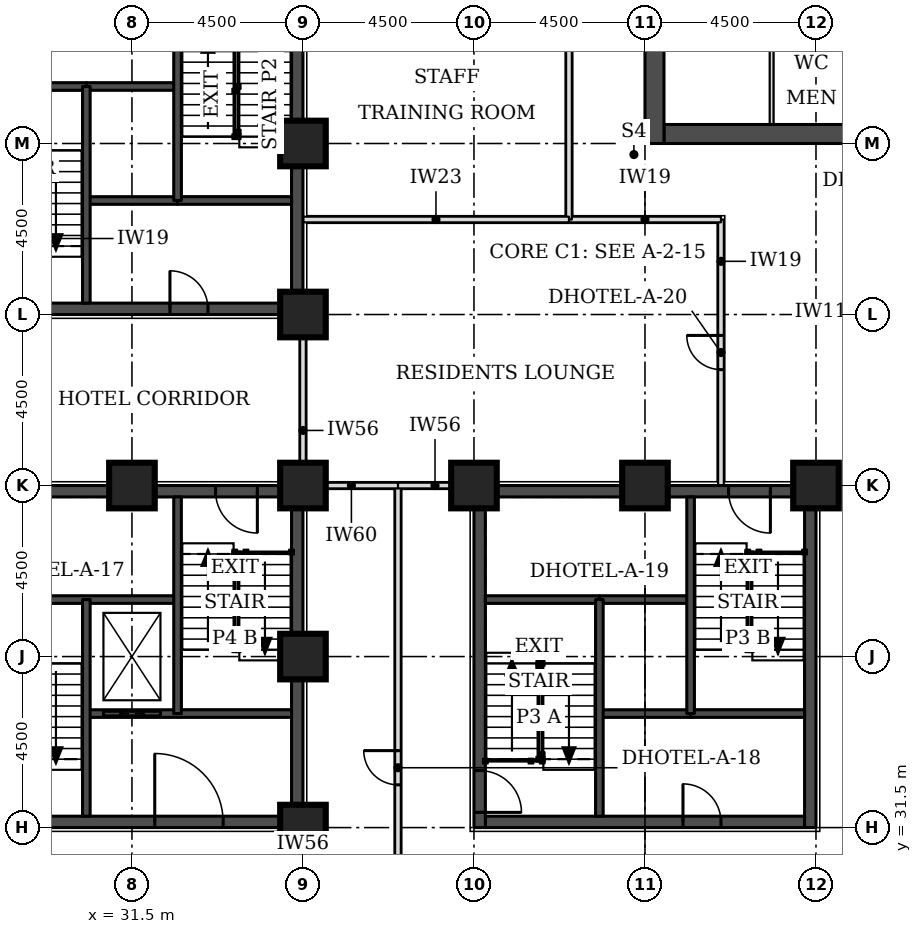
"""IFC4 building model, lengths in metres.
Left out: names, types, materials, properties, quantities, classifications, styles, units other than length and angle.
Written with IfcOpenShell. Run it as: python <this file> out.ifc"""

import sys

from ifc_helpers import new_model, si_unit, direction, frame, frame_2d, origin, origin_2d, place, context, subcontext, project, spatial, rectangle, extrude, element, fill, save


model = new_model("IFC4")
c1 = context("Model", 3, precision=1e-05, world=origin(), true_north=direction((0.0, 1.0)))
c2 = subcontext(c1, "Body", "Model", "MODEL_VIEW")
j1 = project(units=[si_unit("LENGTHUNIT", "METRE"), si_unit("PLANEANGLEUNIT", "RADIAN")], contexts=[c1])
p1 = place(None, origin())
s1 = spatial("IfcSite", under=j1, at=p1, CompositionType="ELEMENT")
p2 = place(p1, origin())
s2 = spatial("IfcBuilding", under=s1, at=p2, CompositionType="ELEMENT")
p3 = place(p2, frame((0.0, 0.0, 49.5)))
s3 = spatial("IfcBuildingStorey", under=s2, at=p3, CompositionType="ELEMENT", Elevation=49.5)
for number, where, z_axis, x_axis in (
    (1, (36.0, 31.5, 0.0), (0.0, 0.0, 1.0), (1.0, 0.0, 0.0)),
    (2, (36.0, 36.0, 0.0), (0.0, 0.0, 1.0), (1.0, 0.0, 0.0)),
    (3, (31.5, 40.5, 0.0), (0.0, 0.0, 1.0), (1.0, 0.0, 0.0)),
    (4, (36.0, 40.5, 0.0), (0.0, 0.0, 1.0), (1.0, 0.0, 0.0)),
    (5, (40.5, 40.5, 0.0), (0.0, 0.0, 1.0), (1.0, 0.0, 0.0)),
    (6, (45.0, 40.5, 0.0), (0.0, 0.0, 1.0), (1.0, 0.0, 0.0)),
    (7, (49.5, 40.5, 0.0), (0.0, 0.0, 1.0), (1.0, 0.0, 0.0)),
    (8, (36.0, 45.0, 0.0), (0.0, 0.0, 1.0), (1.0, 0.0, 0.0)),
    (9, (36.0, 49.5, 0.0), (0.0, 0.0, 1.0), (1.0, 0.0, 0.0)),
):
    element("IfcColumn", number, at=place(p3, frame(where, z_axis=z_axis, x_axis=x_axis)), inside=s3, PredefinedType="COLUMN", context=c2, shape_type="SweptSolid", body=[
        extrude(rectangle(XDim=1.2, YDim=1.2, at=origin_2d()), origin(), (0.0, 0.0, 1.0), 3.3),
    ])
p4 = place(p3, frame((45.5, 49.75, 0.0), z_axis=(0.0, 0.0, 1.0), x_axis=(1.0, 0.0, 0.0)))
e10 = element("IfcWall", 10, at=p4, inside=s3, PredefinedType="SHEAR", context=c2, shape_type="SweptSolid", body=[
    extrude(rectangle(XDim=21.5, YDim=0.5, at=frame_2d((10.75, 0.0))), origin(), (0.0, 0.0, 1.0), 3.3),
])
p5 = place(p3, frame((45.25, 49.5, 0.0), z_axis=(0.0, 0.0, 1.0), x_axis=(0.0, 1.0, 0.0)))
e11 = element("IfcWall", 11, at=p5, inside=s3, PredefinedType="SHEAR", context=c2, shape_type="SweptSolid", body=[
    extrude(rectangle(XDim=22.5, YDim=0.5, at=frame_2d((11.25, 0.0))), origin(), (0.0, 0.0, 1.0), 3.3),
])
p6 = place(p5, frame((4.2, 0.0, 0.0)))
e12 = element("IfcOpeningElement", 12, at=p6, cuts=e11, PredefinedType="OPENING", context=c2, shape_type="SweptSolid", body=[
    extrude(rectangle(XDim=1.8, YDim=2.1, at=frame_2d((0.9, 1.05))), frame((0.0, 0.26, 0.0), z_axis=(0.0, -1.0, 0.0), x_axis=(1.0, 0.0, 0.0)), (0.0, 0.0, 1.0), 0.52),
])
p7 = place(p5, frame((6.9, 0.0, 0.0)))
e13 = element("IfcOpeningElement", 13, at=p7, cuts=e11, PredefinedType="OPENING", context=c2, shape_type="SweptSolid", body=[
    extrude(rectangle(XDim=1.1, YDim=2.1, at=frame_2d((0.55, 1.05))), frame((0.0, 0.26, 0.0), z_axis=(0.0, -1.0, 0.0), x_axis=(1.0, 0.0, 0.0)), (0.0, 0.0, 1.0), 0.52),
])
p8 = place(p5, frame((13.6, 0.0, 0.0)))
e14 = element("IfcOpeningElement", 14, at=p8, cuts=e11, PredefinedType="OPENING", context=c2, shape_type="SweptSolid", body=[
    extrude(rectangle(XDim=1.1, YDim=2.1, at=frame_2d((0.55, 1.05))), frame((0.0, 0.26, 0.0), z_axis=(0.0, -1.0, 0.0), x_axis=(1.0, 0.0, 0.0)), (0.0, 0.0, 1.0), 0.52),
])
p9 = place(p5, frame((16.5, 0.0, 0.0)))
e15 = element("IfcOpeningElement", 15, at=p9, cuts=e11, PredefinedType="OPENING", context=c2, shape_type="SweptSolid", body=[
    extrude(rectangle(XDim=1.8, YDim=2.1, at=frame_2d((0.9, 1.05))), frame((0.0, 0.26, 0.0), z_axis=(0.0, -1.0, 0.0), x_axis=(1.0, 0.0, 0.0)), (0.0, 0.0, 1.0), 0.52),
])
p10 = place(p3, frame((27.3, 45.15, 0.0), z_axis=(0.0, 0.0, 1.0), x_axis=(1.0, 0.0, 0.0)))
e16 = element("IfcWall", 16, at=p10, inside=s3, PredefinedType="SHEAR", context=c2, shape_type="SweptSolid", body=[
    extrude(rectangle(XDim=8.4, YDim=0.3, at=frame_2d((4.2, 0.0))), origin(), (0.0, 0.0, 1.0), 3.3),
])
p11 = place(p10, frame((5.2, 0.0, 0.0)))
e17 = element("IfcOpeningElement", 17, at=p11, cuts=e16, PredefinedType="OPENING", context=c2, shape_type="SweptSolid", body=[
    extrude(rectangle(XDim=1.0, YDim=2.1, at=frame_2d((0.5, 1.05))), frame((0.0, 0.16, 0.0), z_axis=(0.0, -1.0, 0.0), x_axis=(1.0, 0.0, 0.0)), (0.0, 0.0, 1.0), 0.32),
])
p12 = place(p3, frame((35.85, 45.0, 0.0), z_axis=(0.0, 0.0, 1.0), x_axis=(0.0, 1.0, 0.0)))
e18 = element("IfcWall", 18, at=p12, inside=s3, PredefinedType="SHEAR", context=c2, shape_type="SweptSolid", body=[
    extrude(rectangle(XDim=9.0, YDim=0.3, at=frame_2d((4.5, 0.0))), origin(), (0.0, 0.0, 1.0), 3.3),
])
p13 = place(p3, frame((40.8, 31.65, 0.0), z_axis=(0.0, 0.0, 1.0), x_axis=(1.0, 0.0, 0.0)))
e19 = element("IfcWall", 19, at=p13, inside=s3, PredefinedType="SHEAR", context=c2, shape_type="SweptSolid", body=[
    extrude(rectangle(XDim=8.4, YDim=0.3, at=frame_2d((4.2, 0.0))), origin(), (0.0, 0.0, 1.0), 3.3),
])
p14 = place(p13, frame((5.2, 0.0, 0.0)))
e20 = element("IfcOpeningElement", 20, at=p14, cuts=e19, PredefinedType="OPENING", context=c2, shape_type="SweptSolid", body=[
    extrude(rectangle(XDim=1.0, YDim=2.1, at=frame_2d((0.5, 1.05))), frame((0.0, 0.16, 0.0), z_axis=(0.0, -1.0, 0.0), x_axis=(1.0, 0.0, 0.0)), (0.0, 0.0, 1.0), 0.32),
])
p15 = place(p3, frame((40.8, 40.35, 0.0), z_axis=(0.0, 0.0, 1.0), x_axis=(1.0, 0.0, 0.0)))
e21 = element("IfcWall", 21, at=p15, inside=s3, PredefinedType="SHEAR", context=c2, shape_type="SweptSolid", body=[
    extrude(rectangle(XDim=8.4, YDim=0.3, at=frame_2d((4.2, 0.0))), origin(), (0.0, 0.0, 1.0), 3.3),
])
p16 = place(p15, frame((6.4, 0.0, 0.0)))
e22 = element("IfcOpeningElement", 22, at=p16, cuts=e21, PredefinedType="OPENING", context=c2, shape_type="SweptSolid", body=[
    extrude(rectangle(XDim=1.1, YDim=2.1, at=frame_2d((0.55, 1.05))), frame((0.0, 0.16, 0.0), z_axis=(0.0, -1.0, 0.0), x_axis=(1.0, 0.0, 0.0)), (0.0, 0.0, 1.0), 0.32),
])
p17 = place(p3, frame((40.65, 31.5, 0.0), z_axis=(0.0, 0.0, 1.0), x_axis=(0.0, 1.0, 0.0)))
e23 = element("IfcWall", 23, at=p17, inside=s3, PredefinedType="SHEAR", context=c2, shape_type="SweptSolid", body=[
    extrude(rectangle(XDim=9.0, YDim=0.3, at=frame_2d((4.5, 0.0))), origin(), (0.0, 0.0, 1.0), 3.3),
])
p18 = place(p17, frame((0.4, 0.0, 0.0)))
e24 = element("IfcOpeningElement", 24, at=p18, cuts=e23, PredefinedType="OPENING", context=c2, shape_type="SweptSolid", body=[
    extrude(rectangle(XDim=1.1, YDim=2.1, at=frame_2d((0.55, 1.05))), frame((0.0, 0.16, 0.0), z_axis=(0.0, -1.0, 0.0), x_axis=(1.0, 0.0, 0.0)), (0.0, 0.0, 1.0), 0.32),
])
p19 = place(p3, frame((49.35, 31.5, 0.0), z_axis=(0.0, 0.0, 1.0), x_axis=(0.0, 1.0, 0.0)))
e25 = element("IfcWall", 25, at=p19, inside=s3, PredefinedType="SHEAR", context=c2, shape_type="SweptSolid", body=[
    extrude(rectangle(XDim=9.0, YDim=0.3, at=frame_2d((4.5, 0.0))), origin(), (0.0, 0.0, 1.0), 3.3),
])
p20 = place(p3, frame((27.3, 31.65, 0.0), z_axis=(0.0, 0.0, 1.0), x_axis=(1.0, 0.0, 0.0)))
e26 = element("IfcWall", 26, at=p20, inside=s3, PredefinedType="SHEAR", context=c2, shape_type="SweptSolid", body=[
    extrude(rectangle(XDim=8.4, YDim=0.3, at=frame_2d((4.2, 0.0))), origin(), (0.0, 0.0, 1.0), 3.3),
])
p21 = place(p20, frame((4.8, 0.0, 0.0)))
e27 = element("IfcOpeningElement", 27, at=p21, cuts=e26, PredefinedType="OPENING", context=c2, shape_type="SweptSolid", body=[
    extrude(rectangle(XDim=1.8, YDim=2.1, at=frame_2d((0.9, 1.05))), frame((0.0, 0.16, 0.0), z_axis=(0.0, -1.0, 0.0), x_axis=(1.0, 0.0, 0.0)), (0.0, 0.0, 1.0), 0.32),
])
p22 = place(p3, frame((27.3, 40.35, 0.0), z_axis=(0.0, 0.0, 1.0), x_axis=(1.0, 0.0, 0.0)))
e28 = element("IfcWall", 28, at=p22, inside=s3, PredefinedType="SHEAR", context=c2, shape_type="SweptSolid", body=[
    extrude(rectangle(XDim=8.4, YDim=0.3, at=frame_2d((4.2, 0.0))), origin(), (0.0, 0.0, 1.0), 3.3),
])
p23 = place(p22, frame((6.4, 0.0, 0.0)))
e29 = element("IfcOpeningElement", 29, at=p23, cuts=e28, PredefinedType="OPENING", context=c2, shape_type="SweptSolid", body=[
    extrude(rectangle(XDim=1.1, YDim=2.1, at=frame_2d((0.55, 1.05))), frame((0.0, 0.16, 0.0), z_axis=(0.0, -1.0, 0.0), x_axis=(1.0, 0.0, 0.0)), (0.0, 0.0, 1.0), 0.32),
])
p24 = place(p3, frame((35.85, 31.5, 0.0), z_axis=(0.0, 0.0, 1.0), x_axis=(0.0, 1.0, 0.0)))
e30 = element("IfcWall", 30, at=p24, inside=s3, PredefinedType="SHEAR", context=c2, shape_type="SweptSolid", body=[
    extrude(rectangle(XDim=9.0, YDim=0.3, at=frame_2d((4.5, 0.0))), origin(), (0.0, 0.0, 1.0), 3.3),
])
p25 = place(p3, frame((38.5, 25.65, 0.0), z_axis=(0.0, 0.0, 1.0), x_axis=(0.0, 1.0, 0.0)))
e31 = element("IfcWall", 31, at=p25, inside=s3, PredefinedType="PARTITIONING", context=c2, shape_type="SweptSolid", body=[
    extrude(rectangle(XDim=14.85, YDim=0.15, at=frame_2d((7.425, 0.0))), origin(), (0.0, 0.0, 1.0), 3.08),
])
p26 = place(p25, frame((6.975, 0.0, 0.0)))
e32 = element("IfcOpeningElement", 32, at=p26, cuts=e31, PredefinedType="OPENING", context=c2, shape_type="SweptSolid", body=[
    extrude(rectangle(XDim=0.9, YDim=2.1, at=frame_2d((0.45, 1.05))), frame((0.0, 0.085, 0.0), z_axis=(0.0, -1.0, 0.0), x_axis=(1.0, 0.0, 0.0)), (0.0, 0.0, 1.0), 0.17),
])
for number, where, z_axis, x_axis in (
    (33, (36.0, 29.5, 0.0), (0.0, 0.0, 1.0), (0.0, 1.0, 0.0)),
    (34, (38.5, 40.5, 0.0), (0.0, 0.0, 1.0), (1.0, 0.0, 0.0)),
):
    element("IfcWall", number, at=place(p3, frame(where, z_axis=z_axis, x_axis=x_axis)), inside=s3, PredefinedType="PARTITIONING", context=c2, shape_type="SweptSolid", body=[
        extrude(rectangle(XDim=1.95, YDim=0.15, at=frame_2d((0.975, 0.0))), origin(), (0.0, 0.0, 1.0), 2.33),
    ])
p27 = place(p3, frame((36.0, 40.55, 0.0), z_axis=(0.0, 0.0, 1.0), x_axis=(0.0, 1.0, 0.0)))
e35 = element("IfcWall", 35, at=p27, inside=s3, PredefinedType="PARTITIONING", context=c2, shape_type="SweptSolid", body=[
    extrude(rectangle(XDim=4.4, YDim=0.15, at=frame_2d((2.2, 0.0))), origin(), (0.0, 0.0, 1.0), 2.33),
])
p28 = place(p3, frame((47.0, 40.5, 0.0), z_axis=(0.0, 0.0, 1.0), x_axis=(0.0, 1.0, 0.0)))
e36 = element("IfcWall", 36, at=p28, inside=s3, PredefinedType="PARTITIONING", context=c2, shape_type="SweptSolid", body=[
    extrude(rectangle(XDim=7.0, YDim=0.15, at=frame_2d((3.5, 0.0))), origin(), (0.0, 0.0, 1.0), 3.08),
])
p29 = place(p28, frame((3.05, 0.0, 0.0)))
e37 = element("IfcOpeningElement", 37, at=p29, cuts=e36, PredefinedType="OPENING", context=c2, shape_type="SweptSolid", body=[
    extrude(rectangle(XDim=0.9, YDim=2.1, at=frame_2d((0.45, 1.05))), frame((0.0, 0.085, 0.0), z_axis=(0.0, -1.0, 0.0), x_axis=(1.0, 0.0, 0.0)), (0.0, 0.0, 1.0), 0.17),
])
p30 = place(p3, frame((43.0, 47.5, 0.0), z_axis=(0.0, 0.0, 1.0), x_axis=(1.0, 0.0, 0.0)))
e38 = element("IfcWall", 38, at=p30, inside=s3, PredefinedType="PARTITIONING", context=c2, shape_type="SweptSolid", body=[
    extrude(rectangle(XDim=4.0, YDim=0.15, at=frame_2d((2.0, 0.0))), origin(), (0.0, 0.0, 1.0), 3.08),
])
p31 = place(p3, frame((43.0, 47.5, 0.0), z_axis=(0.0, 0.0, 1.0), x_axis=(0.0, 1.0, 0.0)))
e39 = element("IfcWall", 39, at=p31, inside=s3, PredefinedType="PARTITIONING", context=c2, shape_type="SweptSolid", body=[
    extrude(rectangle(XDim=6.5, YDim=0.15, at=frame_2d((3.25, 0.0))), origin(), (0.0, 0.0, 1.0), 3.08),
])
p32 = place(p3, frame((36.05, 40.5, 0.0), z_axis=(0.0, 0.0, 1.0), x_axis=(1.0, 0.0, 0.0)))
e40 = element("IfcWall", 40, at=p32, inside=s3, PredefinedType="PARTITIONING", context=c2, shape_type="SweptSolid", body=[
    extrude(rectangle(XDim=2.45, YDim=0.15, at=frame_2d((1.225, 0.0))), origin(), (0.0, 0.0, 1.0), 2.33),
])
p33 = place(p3, frame((36.0, 47.5, 0.0), z_axis=(0.0, 0.0, 1.0), x_axis=(1.0, 0.0, 0.0)))
e41 = element("IfcWall", 41, at=p33, inside=s3, PredefinedType="PARTITIONING", context=c2, shape_type="SweptSolid", body=[
    extrude(rectangle(XDim=7.0, YDim=0.15, at=frame_2d((3.5, 0.0))), origin(), (0.0, 0.0, 1.0), 3.08),
])
p34 = place(p3, frame((48.333, 50.0, 0.0), z_axis=(0.0, 0.0, 1.0), x_axis=(0.0, 1.0, 0.0)))
e42 = element("IfcWall", 42, at=p34, inside=s3, PredefinedType="PARTITIONING", context=c2, shape_type="SweptSolid", body=[
    extrude(rectangle(XDim=3.0, YDim=0.1, at=frame_2d((1.5, 0.0))), origin(), (0.0, 0.0, 1.0), 3.08),
])
p35 = place(p3, frame((30.3, 48.0, 0.0), z_axis=(0.0, 0.0, 1.0), x_axis=(1.0, 0.0, 0.0)))
e43 = element("IfcWall", 43, at=p35, inside=s3, PredefinedType="SOLIDWALL", context=c2, shape_type="SweptSolid", body=[
    extrude(rectangle(XDim=2.4, YDim=0.2, at=frame_2d((1.2, 0.0))), origin(), (0.0, 0.0, 1.0), 3.08),
])
p36 = place(p3, frame((32.7, 48.0, 0.0), z_axis=(0.0, 0.0, 1.0), x_axis=(1.0, 0.0, 0.0)))
e44 = element("IfcWall", 44, at=p36, inside=s3, PredefinedType="SOLIDWALL", context=c2, shape_type="SweptSolid", body=[
    extrude(rectangle(XDim=3.0, YDim=0.2, at=frame_2d((1.5, 0.0))), origin(), (0.0, 0.0, 1.0), 3.08),
])
p37 = place(p3, frame((30.3, 51.0, 0.0), z_axis=(0.0, 0.0, 1.0), x_axis=(1.0, 0.0, 0.0)))
e45 = element("IfcWall", 45, at=p37, inside=s3, PredefinedType="SOLIDWALL", context=c2, shape_type="SweptSolid", body=[
    extrude(rectangle(XDim=2.4, YDim=0.2, at=frame_2d((1.2, 0.0))), origin(), (0.0, 0.0, 1.0), 3.3),
])
p38 = place(p3, frame((27.3, 51.0, 0.0), z_axis=(0.0, 0.0, 1.0), x_axis=(1.0, 0.0, 0.0)))
e46 = element("IfcWall", 46, at=p38, inside=s3, PredefinedType="SOLIDWALL", context=c2, shape_type="SweptSolid", body=[
    extrude(rectangle(XDim=3.0, YDim=0.2, at=frame_2d((1.5, 0.0))), origin(), (0.0, 0.0, 1.0), 3.08),
])
for number, where, z_axis, x_axis in (
    (47, (30.3, 45.3, 0.0), (0.0, 0.0, 1.0), (0.0, 1.0, 0.0)),
    (48, (32.7, 48.0, 0.0), (0.0, 0.0, 1.0), (0.0, 1.0, 0.0)),
):
    element("IfcWall", number, at=place(p3, frame(where, z_axis=z_axis, x_axis=x_axis)), inside=s3, PredefinedType="SOLIDWALL", context=c2, shape_type="SweptSolid", body=[
        extrude(rectangle(XDim=5.7, YDim=0.2, at=frame_2d((2.85, 0.0))), origin(), (0.0, 0.0, 1.0), 3.08),
    ])
p39 = place(p3, frame((43.8, 34.5, 0.0), z_axis=(0.0, 0.0, 1.0), x_axis=(1.0, 0.0, 0.0)))
e49 = element("IfcWall", 49, at=p39, inside=s3, PredefinedType="SOLIDWALL", context=c2, shape_type="SweptSolid", body=[
    extrude(rectangle(XDim=2.4, YDim=0.2, at=frame_2d((1.2, 0.0))), origin(), (0.0, 0.0, 1.0), 3.08),
])
p40 = place(p3, frame((46.2, 34.5, 0.0), z_axis=(0.0, 0.0, 1.0), x_axis=(1.0, 0.0, 0.0)))
e50 = element("IfcWall", 50, at=p40, inside=s3, PredefinedType="SOLIDWALL", context=c2, shape_type="SweptSolid", body=[
    extrude(rectangle(XDim=3.0, YDim=0.2, at=frame_2d((1.5, 0.0))), origin(), (0.0, 0.0, 1.0), 3.08),
])
p41 = place(p3, frame((43.8, 37.5, 0.0), z_axis=(0.0, 0.0, 1.0), x_axis=(1.0, 0.0, 0.0)))
e51 = element("IfcWall", 51, at=p41, inside=s3, PredefinedType="SOLIDWALL", context=c2, shape_type="SweptSolid", body=[
    extrude(rectangle(XDim=2.4, YDim=0.2, at=frame_2d((1.2, 0.0))), origin(), (0.0, 0.0, 1.0), 3.3),
])
p42 = place(p3, frame((40.8, 37.5, 0.0), z_axis=(0.0, 0.0, 1.0), x_axis=(1.0, 0.0, 0.0)))
e52 = element("IfcWall", 52, at=p42, inside=s3, PredefinedType="SOLIDWALL", context=c2, shape_type="SweptSolid", body=[
    extrude(rectangle(XDim=3.0, YDim=0.2, at=frame_2d((1.5, 0.0))), origin(), (0.0, 0.0, 1.0), 3.08),
])
for number, where, z_axis, x_axis in (
    (53, (43.8, 31.8, 0.0), (0.0, 0.0, 1.0), (0.0, 1.0, 0.0)),
    (54, (46.2, 34.5, 0.0), (0.0, 0.0, 1.0), (0.0, 1.0, 0.0)),
):
    element("IfcWall", number, at=place(p3, frame(where, z_axis=z_axis, x_axis=x_axis)), inside=s3, PredefinedType="SOLIDWALL", context=c2, shape_type="SweptSolid", body=[
        extrude(rectangle(XDim=5.7, YDim=0.2, at=frame_2d((2.85, 0.0))), origin(), (0.0, 0.0, 1.0), 3.08),
    ])
p43 = place(p3, frame((30.3, 34.5, 0.0), z_axis=(0.0, 0.0, 1.0), x_axis=(1.0, 0.0, 0.0)))
e55 = element("IfcWall", 55, at=p43, inside=s3, PredefinedType="SOLIDWALL", context=c2, shape_type="SweptSolid", body=[
    extrude(rectangle(XDim=5.4, YDim=0.2, at=frame_2d((2.7, 0.0))), origin(), (0.0, 0.0, 1.0), 3.08),
])
p44 = place(p43, frame((0.45, 0.0, 0.0)))
e56 = element("IfcOpeningElement", 56, at=p44, cuts=e55, PredefinedType="OPENING", context=c2, shape_type="SweptSolid", body=[
    extrude(rectangle(XDim=1.5, YDim=2.1, at=frame_2d((0.75, 1.05))), frame((0.0, 0.11, 0.0), z_axis=(0.0, -1.0, 0.0), x_axis=(1.0, 0.0, 0.0)), (0.0, 0.0, 1.0), 0.22),
])
p45 = place(p3, frame((27.3, 37.5, 0.0), z_axis=(0.0, 0.0, 1.0), x_axis=(1.0, 0.0, 0.0)))
e57 = element("IfcWall", 57, at=p45, inside=s3, PredefinedType="SOLIDWALL", context=c2, shape_type="SweptSolid", body=[
    extrude(rectangle(XDim=5.4, YDim=0.2, at=frame_2d((2.7, 0.0))), origin(), (0.0, 0.0, 1.0), 3.08),
])
for number, where, z_axis, x_axis in (
    (58, (30.3, 31.8, 0.0), (0.0, 0.0, 1.0), (0.0, 1.0, 0.0)),
    (59, (32.7, 34.5, 0.0), (0.0, 0.0, 1.0), (0.0, 1.0, 0.0)),
):
    element("IfcWall", number, at=place(p3, frame(where, z_axis=z_axis, x_axis=x_axis)), inside=s3, PredefinedType="SOLIDWALL", context=c2, shape_type="SweptSolid", body=[
        extrude(rectangle(XDim=5.7, YDim=0.2, at=frame_2d((2.85, 0.0))), origin(), (0.0, 0.0, 1.0), 3.08),
    ])
p46 = place(p26, origin())
e60 = element("IfcDoor", 60, at=p46, inside=s3, OperationType="SINGLE_SWING_RIGHT", PredefinedType="DOOR", context=c2, shape_type="SweptSolid", body=[
    extrude(rectangle(XDim=0.9, YDim=2.1, at=frame_2d((0.45, 1.05))), frame((0.0, 0.025, 0.0), z_axis=(0.0, -1.0, 0.0), x_axis=(1.0, 0.0, 0.0)), (0.0, 0.0, 1.0), 0.05),
])
fill(e32, e60)
p47 = place(p29, origin())
e61 = element("IfcDoor", 61, at=p47, inside=s3, OperationType="SINGLE_SWING_RIGHT", PredefinedType="DOOR", context=c2, shape_type="SweptSolid", body=[
    extrude(rectangle(XDim=0.9, YDim=2.1, at=frame_2d((0.45, 1.05))), frame((0.0, 0.025, 0.0), z_axis=(0.0, -1.0, 0.0), x_axis=(1.0, 0.0, 0.0)), (0.0, 0.0, 1.0), 0.05),
])
fill(e37, e61)
p48 = place(p11, origin())
e62 = element("IfcDoor", 62, at=p48, inside=s3, OperationType="SINGLE_SWING_LEFT", PredefinedType="DOOR", context=c2, shape_type="SweptSolid", body=[
    extrude(rectangle(XDim=1.0, YDim=2.1, at=frame_2d((0.5, 1.05))), frame((0.0, 0.025, 0.0), z_axis=(0.0, -1.0, 0.0), x_axis=(1.0, 0.0, 0.0)), (0.0, 0.0, 1.0), 0.05),
])
fill(e17, e62)
p49 = place(p18, frame((1.1, 0.0, 0.0), z_axis=(0.0, 0.0, 1.0), x_axis=(-1.0, 0.0, 0.0)))
e63 = element("IfcDoor", 63, at=p49, inside=s3, OperationType="SINGLE_SWING_RIGHT", PredefinedType="DOOR", context=c2, shape_type="SweptSolid", body=[
    extrude(rectangle(XDim=1.1, YDim=2.1, at=frame_2d((0.55, 1.05))), frame((0.0, 0.025, 0.0), z_axis=(0.0, -1.0, 0.0), x_axis=(1.0, 0.0, 0.0)), (0.0, 0.0, 1.0), 0.05),
])
fill(e24, e63)
p50 = place(p16, frame((1.1, 0.0, 0.0), z_axis=(0.0, 0.0, 1.0), x_axis=(-1.0, 0.0, 0.0)))
e64 = element("IfcDoor", 64, at=p50, inside=s3, OperationType="SINGLE_SWING_LEFT", PredefinedType="DOOR", context=c2, shape_type="SweptSolid", body=[
    extrude(rectangle(XDim=1.1, YDim=2.1, at=frame_2d((0.55, 1.05))), frame((0.0, 0.025, 0.0), z_axis=(0.0, -1.0, 0.0), x_axis=(1.0, 0.0, 0.0)), (0.0, 0.0, 1.0), 0.05),
])
fill(e22, e64)
p51 = place(p14, origin())
e65 = element("IfcDoor", 65, at=p51, inside=s3, OperationType="SINGLE_SWING_LEFT", PredefinedType="DOOR", context=c2, shape_type="SweptSolid", body=[
    extrude(rectangle(XDim=1.0, YDim=2.1, at=frame_2d((0.5, 1.05))), frame((0.0, 0.025, 0.0), z_axis=(0.0, -1.0, 0.0), x_axis=(1.0, 0.0, 0.0)), (0.0, 0.0, 1.0), 0.05),
])
fill(e20, e65)
p52 = place(p23, frame((1.1, 0.0, 0.0), z_axis=(0.0, 0.0, 1.0), x_axis=(-1.0, 0.0, 0.0)))
e66 = element("IfcDoor", 66, at=p52, inside=s3, OperationType="SINGLE_SWING_LEFT", PredefinedType="DOOR", context=c2, shape_type="SweptSolid", body=[
    extrude(rectangle(XDim=1.1, YDim=2.1, at=frame_2d((0.55, 1.05))), frame((0.0, 0.025, 0.0), z_axis=(0.0, -1.0, 0.0), x_axis=(1.0, 0.0, 0.0)), (0.0, 0.0, 1.0), 0.05),
])
fill(e29, e66)
p53 = place(p44, origin())
e67 = element("IfcDoor", 67, at=p53, inside=s3, OperationType="DOUBLE_DOOR_SLIDING", PredefinedType="DOOR", context=c2, shape_type="SweptSolid", body=[
    extrude(rectangle(XDim=1.5, YDim=2.1, at=frame_2d((0.75, 1.05))), frame((0.0, 0.025, 0.0), z_axis=(0.0, -1.0, 0.0), x_axis=(1.0, 0.0, 0.0)), (0.0, 0.0, 1.0), 0.05),
])
fill(e56, e67)
p54 = place(p21, origin())
e68 = element("IfcDoor", 68, at=p54, inside=s3, OperationType="SINGLE_SWING_LEFT", PredefinedType="DOOR", context=c2, shape_type="SweptSolid", body=[
    extrude(rectangle(XDim=1.8, YDim=2.1, at=frame_2d((0.9, 1.05))), frame((0.0, 0.025, 0.0), z_axis=(0.0, -1.0, 0.0), x_axis=(1.0, 0.0, 0.0)), (0.0, 0.0, 1.0), 0.05),
])
fill(e27, e68)
save(model, sys.argv[1])
